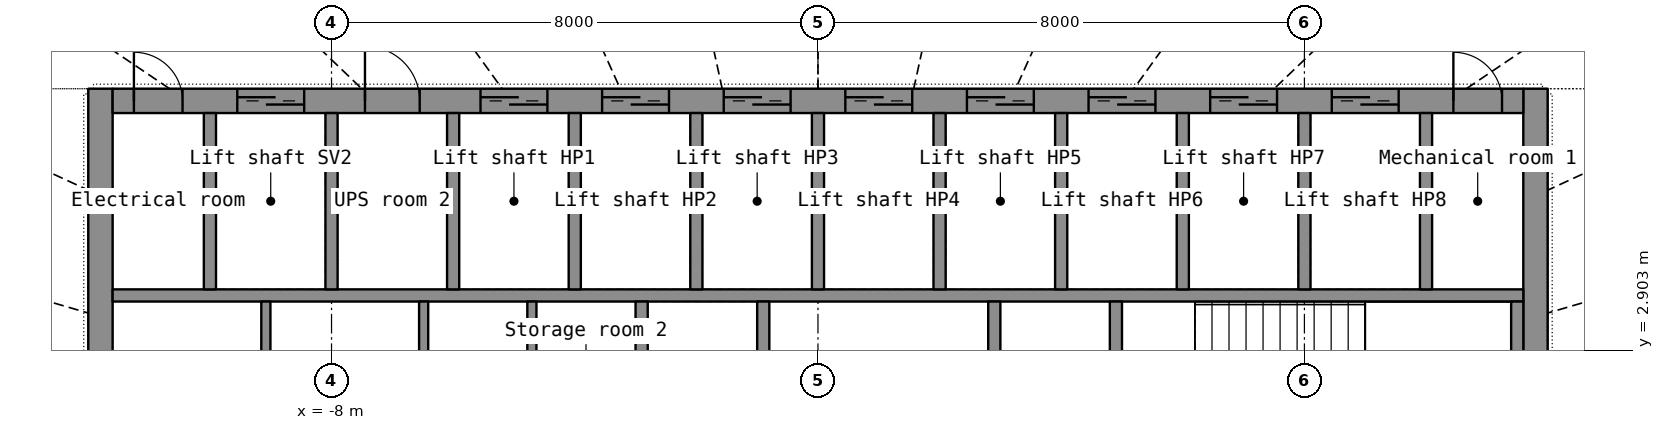
"""IFC4 building model, lengths in metres.
Left out: names, types, materials, properties, quantities, classifications, styles, units other than length and angle.
Written with IfcOpenShell. Run it as: python <this file> out.ifc"""

import sys

from ifc_helpers import new_model, si_unit, direction, frame, frame_2d, origin, place, context, subcontext, project, spatial, rectangle, extrude, element, fill, save


model = new_model("IFC4")
c1 = context("Model", 3, precision=1e-05, world=origin(), true_north=direction((0.0, 1.0)))
c2 = subcontext(c1, "Body", "Model", "MODEL_VIEW")
j1 = project(units=[si_unit("LENGTHUNIT", "METRE"), si_unit("PLANEANGLEUNIT", "RADIAN")], contexts=[c1])
p1 = place(None, origin())
s1 = spatial("IfcSite", under=j1, at=p1, CompositionType="ELEMENT")
p2 = place(p1, origin())
s2 = spatial("IfcBuilding", under=s1, at=p2, CompositionType="ELEMENT")
p3 = place(p2, frame((0.0, 0.0, 243.0)))
s3 = spatial("IfcBuildingStorey", under=s2, at=p3, CompositionType="ELEMENT", Elevation=243.0)
p4 = place(p3, frame((-11.8, -7.2, 0.0), z_axis=(0.0, 0.0, 1.0), x_axis=(0.0, 1.0, 0.0)))
e1 = element("IfcWall", 1, at=p4, inside=s3, PredefinedType="SHEAR", context=c2, shape_type="SweptSolid", body=[
    extrude(rectangle(XDim=14.4, YDim=0.4, at=frame_2d((7.2, 0.0))), origin(), (0.0, 0.0, 1.0), 3.3),
])
p5 = place(p4, frame((6.5, 0.0, 0.0)))
e2 = element("IfcOpeningElement", 2, at=p5, cuts=e1, PredefinedType="OPENING", context=c2, shape_type="SweptSolid", body=[
    extrude(rectangle(XDim=1.4, YDim=2.2, at=frame_2d((0.7, 1.1))), frame((0.0, 0.21, 0.0), z_axis=(0.0, -1.0, 0.0), x_axis=(1.0, 0.0, 0.0)), (0.0, 0.0, 1.0), 0.42),
])
p6 = place(p3, frame((11.8, -7.2, 0.0), z_axis=(0.0, 0.0, 1.0), x_axis=(0.0, 1.0, 0.0)))
e3 = element("IfcWall", 3, at=p6, inside=s3, PredefinedType="SHEAR", context=c2, shape_type="SweptSolid", body=[
    extrude(rectangle(XDim=14.4, YDim=0.4, at=frame_2d((7.2, 0.0))), origin(), (0.0, 0.0, 1.0), 3.3),
])
p7 = place(p6, frame((6.5, 0.0, 0.0)))
e4 = element("IfcOpeningElement", 4, at=p7, cuts=e3, PredefinedType="OPENING", context=c2, shape_type="SweptSolid", body=[
    extrude(rectangle(XDim=1.4, YDim=2.2, at=frame_2d((0.7, 1.1))), frame((0.0, 0.21, 0.0), z_axis=(0.0, -1.0, 0.0), x_axis=(1.0, 0.0, 0.0)), (0.0, 0.0, 1.0), 0.42),
])
p8 = place(p3, frame((-11.6, 7.0, 0.0), z_axis=(0.0, 0.0, 1.0), x_axis=(1.0, 0.0, 0.0)))
e5 = element("IfcWall", 5, at=p8, inside=s3, PredefinedType="SHEAR", context=c2, shape_type="SweptSolid", body=[
    extrude(rectangle(XDim=23.2, YDim=0.4, at=frame_2d((11.6, 0.0))), origin(), (0.0, 0.0, 1.0), 3.3),
])
p9 = place(p8, frame((2.05, 0.0, 0.0)))
e6 = element("IfcOpeningElement", 6, at=p9, cuts=e5, PredefinedType="OPENING", context=c2, shape_type="SweptSolid", body=[
    extrude(rectangle(XDim=1.1, YDim=2.2, at=frame_2d((0.55, 1.1))), frame((0.0, 0.21, 0.0), z_axis=(0.0, -1.0, 0.0), x_axis=(1.0, 0.0, 0.0)), (0.0, 0.0, 1.0), 0.42),
])
p10 = place(p8, frame((6.05, 0.0, 0.0)))
e7 = element("IfcOpeningElement", 7, at=p10, cuts=e5, PredefinedType="OPENING", context=c2, shape_type="SweptSolid", body=[
    extrude(rectangle(XDim=1.1, YDim=2.2, at=frame_2d((0.55, 1.1))), frame((0.0, 0.21, 0.0), z_axis=(0.0, -1.0, 0.0), x_axis=(1.0, 0.0, 0.0)), (0.0, 0.0, 1.0), 0.42),
])
p11 = place(p8, frame((8.05, 0.0, 0.0)))
e8 = element("IfcOpeningElement", 8, at=p11, cuts=e5, PredefinedType="OPENING", context=c2, shape_type="SweptSolid", body=[
    extrude(rectangle(XDim=1.1, YDim=2.2, at=frame_2d((0.55, 1.1))), frame((0.0, 0.21, 0.0), z_axis=(0.0, -1.0, 0.0), x_axis=(1.0, 0.0, 0.0)), (0.0, 0.0, 1.0), 0.42),
])
p12 = place(p8, frame((10.05, 0.0, 0.0)))
e9 = element("IfcOpeningElement", 9, at=p12, cuts=e5, PredefinedType="OPENING", context=c2, shape_type="SweptSolid", body=[
    extrude(rectangle(XDim=1.1, YDim=2.2, at=frame_2d((0.55, 1.1))), frame((0.0, 0.21, 0.0), z_axis=(0.0, -1.0, 0.0), x_axis=(1.0, 0.0, 0.0)), (0.0, 0.0, 1.0), 0.42),
])
p13 = place(p8, frame((12.05, 0.0, 0.0)))
e10 = element("IfcOpeningElement", 10, at=p13, cuts=e5, PredefinedType="OPENING", context=c2, shape_type="SweptSolid", body=[
    extrude(rectangle(XDim=1.1, YDim=2.2, at=frame_2d((0.55, 1.1))), frame((0.0, 0.21, 0.0), z_axis=(0.0, -1.0, 0.0), x_axis=(1.0, 0.0, 0.0)), (0.0, 0.0, 1.0), 0.42),
])
p14 = place(p8, frame((14.05, 0.0, 0.0)))
e11 = element("IfcOpeningElement", 11, at=p14, cuts=e5, PredefinedType="OPENING", context=c2, shape_type="SweptSolid", body=[
    extrude(rectangle(XDim=1.1, YDim=2.2, at=frame_2d((0.55, 1.1))), frame((0.0, 0.21, 0.0), z_axis=(0.0, -1.0, 0.0), x_axis=(1.0, 0.0, 0.0)), (0.0, 0.0, 1.0), 0.42),
])
p15 = place(p8, frame((16.05, 0.0, 0.0)))
e12 = element("IfcOpeningElement", 12, at=p15, cuts=e5, PredefinedType="OPENING", context=c2, shape_type="SweptSolid", body=[
    extrude(rectangle(XDim=1.1, YDim=2.2, at=frame_2d((0.55, 1.1))), frame((0.0, 0.21, 0.0), z_axis=(0.0, -1.0, 0.0), x_axis=(1.0, 0.0, 0.0)), (0.0, 0.0, 1.0), 0.42),
])
p16 = place(p8, frame((18.05, 0.0, 0.0)))
e13 = element("IfcOpeningElement", 13, at=p16, cuts=e5, PredefinedType="OPENING", context=c2, shape_type="SweptSolid", body=[
    extrude(rectangle(XDim=1.1, YDim=2.2, at=frame_2d((0.55, 1.1))), frame((0.0, 0.21, 0.0), z_axis=(0.0, -1.0, 0.0), x_axis=(1.0, 0.0, 0.0)), (0.0, 0.0, 1.0), 0.42),
])
p17 = place(p8, frame((20.05, 0.0, 0.0)))
e14 = element("IfcOpeningElement", 14, at=p17, cuts=e5, PredefinedType="OPENING", context=c2, shape_type="SweptSolid", body=[
    extrude(rectangle(XDim=1.1, YDim=2.2, at=frame_2d((0.55, 1.1))), frame((0.0, 0.21, 0.0), z_axis=(0.0, -1.0, 0.0), x_axis=(1.0, 0.0, 0.0)), (0.0, 0.0, 1.0), 0.42),
])
p18 = place(p8, frame((4.15, 0.0, 0.0)))
e15 = element("IfcOpeningElement", 15, at=p18, cuts=e5, PredefinedType="OPENING", context=c2, shape_type="SweptSolid", body=[
    extrude(rectangle(XDim=0.9, YDim=2.1, at=frame_2d((0.45, 1.05))), frame((0.0, 0.21, 0.0), z_axis=(0.0, -1.0, 0.0), x_axis=(1.0, 0.0, 0.0)), (0.0, 0.0, 1.0), 0.42),
])
p19 = place(p8, frame((0.35, 0.0, 0.0)))
e16 = element("IfcOpeningElement", 16, at=p19, cuts=e5, PredefinedType="OPENING", context=c2, shape_type="SweptSolid", body=[
    extrude(rectangle(XDim=0.8, YDim=2.05, at=frame_2d((0.4, 1.025))), frame((0.0, 0.21, 0.0), z_axis=(0.0, -1.0, 0.0), x_axis=(1.0, 0.0, 0.0)), (0.0, 0.0, 1.0), 0.42),
])
p20 = place(p8, frame((22.05, 0.0, 0.0)))
e17 = element("IfcOpeningElement", 17, at=p20, cuts=e5, PredefinedType="OPENING", context=c2, shape_type="SweptSolid", body=[
    extrude(rectangle(XDim=0.8, YDim=2.05, at=frame_2d((0.4, 1.025))), frame((0.0, 0.21, 0.0), z_axis=(0.0, -1.0, 0.0), x_axis=(1.0, 0.0, 0.0)), (0.0, 0.0, 1.0), 0.42),
])
p21 = place(p3, frame((-11.6, 3.8, 0.0), z_axis=(0.0, 0.0, 1.0), x_axis=(1.0, 0.0, 0.0)))
e18 = element("IfcWall", 18, at=p21, inside=s3, PredefinedType="SHEAR", context=c2, shape_type="SweptSolid", body=[
    extrude(rectangle(XDim=23.2, YDim=0.2, at=frame_2d((11.6, 0.0))), origin(), (0.0, 0.0, 1.0), 3.3),
])
for number, where, z_axis, x_axis in (
    (19, (-10.0, 3.9, 0.0), (0.0, 0.0, 1.0), (0.0, 1.0, 0.0)),
    (20, (-8.0, 3.9, 0.0), (0.0, 0.0, 1.0), (0.0, 1.0, 0.0)),
    (21, (-6.0, 3.9, 0.0), (0.0, 0.0, 1.0), (0.0, 1.0, 0.0)),
    (22, (-4.0, 3.9, 0.0), (0.0, 0.0, 1.0), (0.0, 1.0, 0.0)),
    (23, (-2.0, 3.9, 0.0), (0.0, 0.0, 1.0), (0.0, 1.0, 0.0)),
    (24, (0.0, 3.9, 0.0), (0.0, 0.0, 1.0), (0.0, 1.0, 0.0)),
    (25, (2.0, 3.9, 0.0), (0.0, 0.0, 1.0), (0.0, 1.0, 0.0)),
    (26, (4.0, 3.9, 0.0), (0.0, 0.0, 1.0), (0.0, 1.0, 0.0)),
    (27, (6.0, 3.9, 0.0), (0.0, 0.0, 1.0), (0.0, 1.0, 0.0)),
    (28, (8.0, 3.9, 0.0), (0.0, 0.0, 1.0), (0.0, 1.0, 0.0)),
    (29, (10.0, 3.9, 0.0), (0.0, 0.0, 1.0), (0.0, 1.0, 0.0)),
):
    element("IfcWall", number, at=place(p3, frame(where, z_axis=z_axis, x_axis=x_axis)), inside=s3, PredefinedType="SHEAR", context=c2, shape_type="SweptSolid", body=[
        extrude(rectangle(XDim=2.9, YDim=0.2, at=frame_2d((1.45, 0.0))), origin(), (0.0, 0.0, 1.0), 3.3),
    ])
p22 = place(p3, frame((-2.9, -3.7, 0.0), z_axis=(0.0, 0.0, 1.0), x_axis=(0.0, 1.0, 0.0)))
e30 = element("IfcWall", 30, at=p22, inside=s3, PredefinedType="SHEAR", context=c2, shape_type="SweptSolid", body=[
    extrude(rectangle(XDim=7.4, YDim=0.2, at=frame_2d((3.7, 0.0))), origin(), (0.0, 0.0, 1.0), 3.3),
])
p23 = place(p22, frame((3.1, 0.0, 0.0)))
e31 = element("IfcOpeningElement", 31, at=p23, cuts=e30, PredefinedType="OPENING", context=c2, shape_type="SweptSolid", body=[
    extrude(rectangle(XDim=1.2, YDim=2.2, at=frame_2d((0.6, 1.1))), frame((0.0, 0.11, 0.0), z_axis=(0.0, -1.0, 0.0), x_axis=(1.0, 0.0, 0.0)), (0.0, 0.0, 1.0), 0.22),
])
p24 = place(p3, frame((2.9, -3.7, 0.0), z_axis=(0.0, 0.0, 1.0), x_axis=(0.0, 1.0, 0.0)))
e32 = element("IfcWall", 32, at=p24, inside=s3, PredefinedType="SHEAR", context=c2, shape_type="SweptSolid", body=[
    extrude(rectangle(XDim=7.4, YDim=0.2, at=frame_2d((3.7, 0.0))), origin(), (0.0, 0.0, 1.0), 3.3),
])
p25 = place(p24, frame((3.1, 0.0, 0.0)))
e33 = element("IfcOpeningElement", 33, at=p25, cuts=e32, PredefinedType="OPENING", context=c2, shape_type="SweptSolid", body=[
    extrude(rectangle(XDim=1.2, YDim=2.2, at=frame_2d((0.6, 1.1))), frame((0.0, 0.11, 0.0), z_axis=(0.0, -1.0, 0.0), x_axis=(1.0, 0.0, 0.0)), (0.0, 0.0, 1.0), 0.22),
])
for number, where, z_axis, x_axis in (
    (34, (-0.9, 1.35, 0.0), (0.0, 0.0, 1.0), (0.0, 1.0, 0.0)),
    (35, (11.5, 1.35, 0.0), (0.0, 0.0, 1.0), (0.0, 1.0, 0.0)),
    (36, (4.9, 1.35, 0.0), (0.0, 0.0, 1.0), (0.0, 1.0, 0.0)),
):
    element("IfcWall", number, at=place(p3, frame(where, z_axis=z_axis, x_axis=x_axis)), inside=s3, PredefinedType="SHEAR", context=c2, shape_type="SweptSolid", body=[
        extrude(rectangle(XDim=2.35, YDim=0.2, at=frame_2d((1.175, 0.0))), origin(), (0.0, 0.0, 1.0), 3.3),
    ])
for number, where, z_axis, x_axis in (
    (37, (-9.08, 1.35, 0.0), (0.0, 0.0, 1.0), (0.0, 1.0, 0.0)),
    (38, (-6.485, 1.35, 0.0), (0.0, 0.0, 1.0), (0.0, 1.0, 0.0)),
    (39, (-4.705, 1.35, 0.0), (0.0, 0.0, 1.0), (0.0, 1.0, 0.0)),
):
    element("IfcWall", number, at=place(p3, frame(where, z_axis=z_axis, x_axis=x_axis)), inside=s3, PredefinedType="PARTITIONING", context=c2, shape_type="SweptSolid", body=[
        extrude(rectangle(XDim=2.35, YDim=0.15, at=frame_2d((1.175, 0.0))), origin(), (0.0, 0.0, 1.0), 3.3),
    ])
p26 = place(p9, origin())
e40 = element("IfcDoor", 40, at=p26, inside=s3, OperationType="DOUBLE_DOOR_SLIDING", PredefinedType="DOOR", context=c2, shape_type="SweptSolid", body=[
    extrude(rectangle(XDim=1.1, YDim=2.2, at=frame_2d((0.55, 1.1))), frame((0.0, 0.025, 0.0), z_axis=(0.0, -1.0, 0.0), x_axis=(1.0, 0.0, 0.0)), (0.0, 0.0, 1.0), 0.05),
])
fill(e6, e40)
p27 = place(p10, origin())
e41 = element("IfcDoor", 41, at=p27, inside=s3, OperationType="DOUBLE_DOOR_SLIDING", PredefinedType="DOOR", context=c2, shape_type="SweptSolid", body=[
    extrude(rectangle(XDim=1.1, YDim=2.2, at=frame_2d((0.55, 1.1))), frame((0.0, 0.025, 0.0), z_axis=(0.0, -1.0, 0.0), x_axis=(1.0, 0.0, 0.0)), (0.0, 0.0, 1.0), 0.05),
])
fill(e7, e41)
p28 = place(p11, origin())
e42 = element("IfcDoor", 42, at=p28, inside=s3, OperationType="DOUBLE_DOOR_SLIDING", PredefinedType="DOOR", context=c2, shape_type="SweptSolid", body=[
    extrude(rectangle(XDim=1.1, YDim=2.2, at=frame_2d((0.55, 1.1))), frame((0.0, 0.025, 0.0), z_axis=(0.0, -1.0, 0.0), x_axis=(1.0, 0.0, 0.0)), (0.0, 0.0, 1.0), 0.05),
])
fill(e8, e42)
p29 = place(p12, origin())
e43 = element("IfcDoor", 43, at=p29, inside=s3, OperationType="DOUBLE_DOOR_SLIDING", PredefinedType="DOOR", context=c2, shape_type="SweptSolid", body=[
    extrude(rectangle(XDim=1.1, YDim=2.2, at=frame_2d((0.55, 1.1))), frame((0.0, 0.025, 0.0), z_axis=(0.0, -1.0, 0.0), x_axis=(1.0, 0.0, 0.0)), (0.0, 0.0, 1.0), 0.05),
])
fill(e9, e43)
p30 = place(p13, origin())
e44 = element("IfcDoor", 44, at=p30, inside=s3, OperationType="DOUBLE_DOOR_SLIDING", PredefinedType="DOOR", context=c2, shape_type="SweptSolid", body=[
    extrude(rectangle(XDim=1.1, YDim=2.2, at=frame_2d((0.55, 1.1))), frame((0.0, 0.025, 0.0), z_axis=(0.0, -1.0, 0.0), x_axis=(1.0, 0.0, 0.0)), (0.0, 0.0, 1.0), 0.05),
])
fill(e10, e44)
p31 = place(p14, origin())
e45 = element("IfcDoor", 45, at=p31, inside=s3, OperationType="DOUBLE_DOOR_SLIDING", PredefinedType="DOOR", context=c2, shape_type="SweptSolid", body=[
    extrude(rectangle(XDim=1.1, YDim=2.2, at=frame_2d((0.55, 1.1))), frame((0.0, 0.025, 0.0), z_axis=(0.0, -1.0, 0.0), x_axis=(1.0, 0.0, 0.0)), (0.0, 0.0, 1.0), 0.05),
])
fill(e11, e45)
p32 = place(p15, origin())
e46 = element("IfcDoor", 46, at=p32, inside=s3, OperationType="DOUBLE_DOOR_SLIDING", PredefinedType="DOOR", context=c2, shape_type="SweptSolid", body=[
    extrude(rectangle(XDim=1.1, YDim=2.2, at=frame_2d((0.55, 1.1))), frame((0.0, 0.025, 0.0), z_axis=(0.0, -1.0, 0.0), x_axis=(1.0, 0.0, 0.0)), (0.0, 0.0, 1.0), 0.05),
])
fill(e12, e46)
p33 = place(p16, origin())
e47 = element("IfcDoor", 47, at=p33, inside=s3, OperationType="DOUBLE_DOOR_SLIDING", PredefinedType="DOOR", context=c2, shape_type="SweptSolid", body=[
    extrude(rectangle(XDim=1.1, YDim=2.2, at=frame_2d((0.55, 1.1))), frame((0.0, 0.025, 0.0), z_axis=(0.0, -1.0, 0.0), x_axis=(1.0, 0.0, 0.0)), (0.0, 0.0, 1.0), 0.05),
])
fill(e13, e47)
p34 = place(p17, origin())
e48 = element("IfcDoor", 48, at=p34, inside=s3, OperationType="DOUBLE_DOOR_SLIDING", PredefinedType="DOOR", context=c2, shape_type="SweptSolid", body=[
    extrude(rectangle(XDim=1.1, YDim=2.2, at=frame_2d((0.55, 1.1))), frame((0.0, 0.025, 0.0), z_axis=(0.0, -1.0, 0.0), x_axis=(1.0, 0.0, 0.0)), (0.0, 0.0, 1.0), 0.05),
])
fill(e14, e48)
p35 = place(p18, origin())
e49 = element("IfcDoor", 49, at=p35, inside=s3, OperationType="SINGLE_SWING_LEFT", PredefinedType="DOOR", context=c2, shape_type="SweptSolid", body=[
    extrude(rectangle(XDim=0.9, YDim=2.1, at=frame_2d((0.45, 1.05))), frame((0.0, 0.025, 0.0), z_axis=(0.0, -1.0, 0.0), x_axis=(1.0, 0.0, 0.0)), (0.0, 0.0, 1.0), 0.05),
])
fill(e15, e49)
p36 = place(p19, origin())
e50 = element("IfcDoor", 50, at=p36, inside=s3, OperationType="SINGLE_SWING_LEFT", PredefinedType="DOOR", context=c2, shape_type="SweptSolid", body=[
    extrude(rectangle(XDim=0.8, YDim=2.05, at=frame_2d((0.4, 1.025))), frame((0.0, 0.025, 0.0), z_axis=(0.0, -1.0, 0.0), x_axis=(1.0, 0.0, 0.0)), (0.0, 0.0, 1.0), 0.05),
])
fill(e16, e50)
p37 = place(p20, origin())
e51 = element("IfcDoor", 51, at=p37, inside=s3, OperationType="SINGLE_SWING_LEFT", PredefinedType="DOOR", context=c2, shape_type="SweptSolid", body=[
    extrude(rectangle(XDim=0.8, YDim=2.05, at=frame_2d((0.4, 1.025))), frame((0.0, 0.025, 0.0), z_axis=(0.0, -1.0, 0.0), x_axis=(1.0, 0.0, 0.0)), (0.0, 0.0, 1.0), 0.05),
])
fill(e17, e51)
save(model, sys.argv[1])
